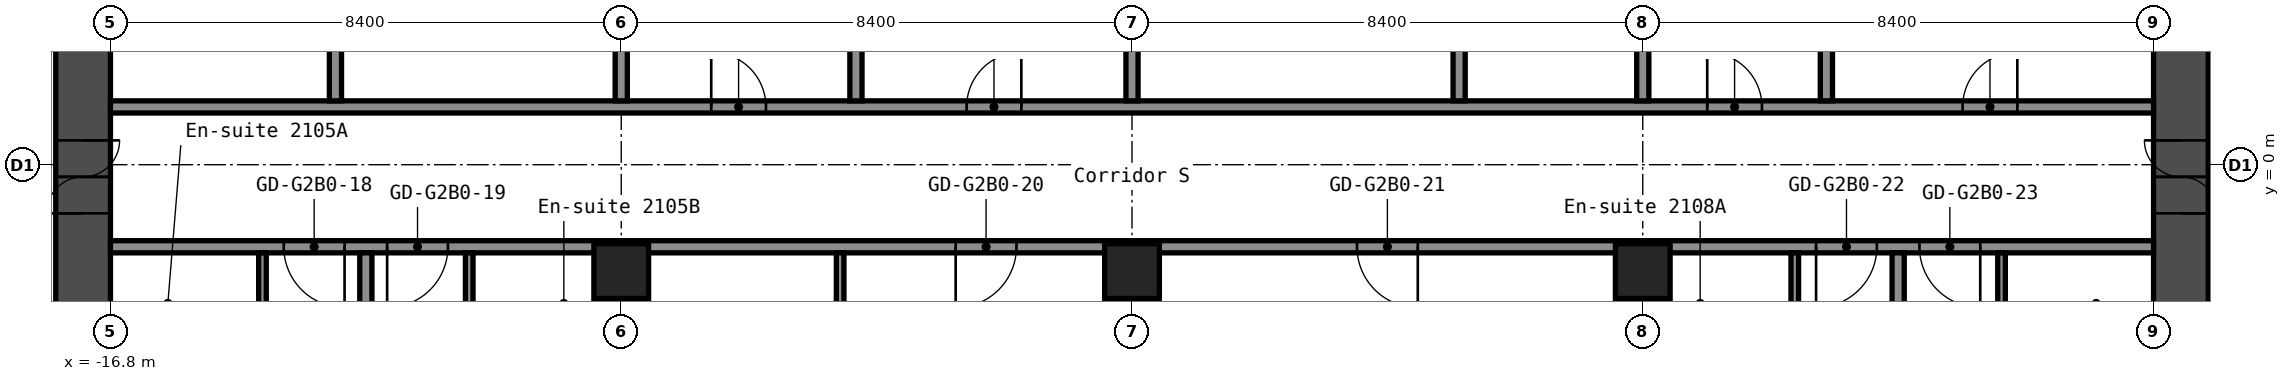
"""IFC4 building model, lengths in metres.
Left out: names, types, materials, properties, quantities, classifications, styles, units other than length and angle.
Written with IfcOpenShell. Run it as: python <this file> out.ifc"""

import sys

from ifc_helpers import new_model, si_unit, direction, frame, frame_2d, origin, origin_2d, place, context, subcontext, project, spatial, rectangle, hollow_rectangle, extrude, element, fill, save


model = new_model("IFC4")
c1 = context("Model", 3, precision=1e-05, world=origin(), true_north=direction((0.0, 1.0)))
c2 = subcontext(c1, "Body", "Model", "MODEL_VIEW")
j1 = project(units=[si_unit("LENGTHUNIT", "METRE"), si_unit("PLANEANGLEUNIT", "RADIAN")], contexts=[c1])
p1 = place(None, origin())
s1 = spatial("IfcSite", under=j1, at=p1, CompositionType="ELEMENT")
p2 = place(p1, origin())
s2 = spatial("IfcBuilding", under=s1, at=p2, CompositionType="ELEMENT")
p3 = place(p2, frame((0.0, 0.0, 78.6)))
s3 = spatial("IfcBuildingStorey", under=s2, at=p3, CompositionType="ELEMENT", Elevation=78.6)
for number, where, z_axis, x_axis in (
    (1, (-8.4, -1.75, 0.0), (0.0, 0.0, 1.0), (1.0, 0.0, 0.0)),
    (2, (0.0, -1.75, 0.0), (0.0, 0.0, 1.0), (1.0, 0.0, 0.0)),
    (3, (8.4, -1.75, 0.0), (0.0, 0.0, 1.0), (1.0, 0.0, 0.0)),
):
    element("IfcColumn", number, at=place(p3, frame(where, z_axis=z_axis, x_axis=x_axis)), inside=s3, PredefinedType="COLUMN", context=c2, shape_type="SweptSolid", body=[
        extrude(hollow_rectangle(XDim=0.9, YDim=0.9, WallThickness=0.036, at=origin_2d()), origin(), (0.0, 0.0, 1.0), 2.8),
    ])
p4 = place(p3, frame((-17.25, -8.4, 0.0), z_axis=(0.0, 0.0, 1.0), x_axis=(0.0, 1.0, 0.0)))
e4 = element("IfcWall", 4, at=p4, inside=s3, PredefinedType="SHEAR", context=c2, shape_type="SweptSolid", body=[
    extrude(rectangle(XDim=16.8, YDim=0.9, at=frame_2d((8.4, 0.0))), origin(), (0.0, 0.0, 1.0), 2.8),
])
p5 = place(p4, frame((7.6, 0.0, 0.0)))
e5 = element("IfcOpeningElement", 5, at=p5, cuts=e4, PredefinedType="OPENING", context=c2, shape_type="SweptSolid", body=[
    extrude(rectangle(XDim=1.2, YDim=2.1, at=frame_2d((0.6, 1.05))), frame((0.0, 0.46, 0.0), z_axis=(0.0, -1.0, 0.0), x_axis=(1.0, 0.0, 0.0)), (0.0, 0.0, 1.0), 0.92),
])
p6 = place(p3, frame((17.25, -8.4, 0.0), z_axis=(0.0, 0.0, 1.0), x_axis=(0.0, 1.0, 0.0)))
e6 = element("IfcWall", 6, at=p6, inside=s3, PredefinedType="SHEAR", context=c2, shape_type="SweptSolid", body=[
    extrude(rectangle(XDim=16.8, YDim=0.9, at=frame_2d((8.4, 0.0))), origin(), (0.0, 0.0, 1.0), 2.8),
])
p7 = place(p6, frame((7.6, 0.0, 0.0)))
e7 = element("IfcOpeningElement", 7, at=p7, cuts=e6, PredefinedType="OPENING", context=c2, shape_type="SweptSolid", body=[
    extrude(rectangle(XDim=1.2, YDim=2.1, at=frame_2d((0.6, 1.05))), frame((0.0, 0.46, 0.0), z_axis=(0.0, -1.0, 0.0), x_axis=(1.0, 0.0, 0.0)), (0.0, 0.0, 1.0), 0.92),
])
p8 = place(p3, frame((-16.8, -1.35, 0.0), z_axis=(0.0, 0.0, 1.0), x_axis=(1.0, 0.0, 0.0)))
e8 = element("IfcWall", 8, at=p8, inside=s3, PredefinedType="PARTITIONING", context=c2, shape_type="SweptSolid", body=[
    extrude(rectangle(XDim=33.6, YDim=0.2, at=frame_2d((16.8, 0.0))), origin(), (0.0, 0.0, 1.0), 2.8),
])
p9 = place(p8, frame((2.85, 0.0, 0.0)))
e9 = element("IfcOpeningElement", 9, at=p9, cuts=e8, PredefinedType="OPENING", context=c2, shape_type="SweptSolid", body=[
    extrude(rectangle(XDim=1.0, YDim=2.1, at=frame_2d((0.5, 1.05))), frame((0.0, 0.11, 0.0), z_axis=(0.0, -1.0, 0.0), x_axis=(1.0, 0.0, 0.0)), (0.0, 0.0, 1.0), 0.22),
])
p10 = place(p8, frame((4.55, 0.0, 0.0)))
e10 = element("IfcOpeningElement", 10, at=p10, cuts=e8, PredefinedType="OPENING", context=c2, shape_type="SweptSolid", body=[
    extrude(rectangle(XDim=1.0, YDim=2.1, at=frame_2d((0.5, 1.05))), frame((0.0, 0.11, 0.0), z_axis=(0.0, -1.0, 0.0), x_axis=(1.0, 0.0, 0.0)), (0.0, 0.0, 1.0), 0.22),
])
p11 = place(p8, frame((13.9, 0.0, 0.0)))
e11 = element("IfcOpeningElement", 11, at=p11, cuts=e8, PredefinedType="OPENING", context=c2, shape_type="SweptSolid", body=[
    extrude(rectangle(XDim=1.0, YDim=2.1, at=frame_2d((0.5, 1.05))), frame((0.0, 0.11, 0.0), z_axis=(0.0, -1.0, 0.0), x_axis=(1.0, 0.0, 0.0)), (0.0, 0.0, 1.0), 0.22),
])
p12 = place(p8, frame((20.5, 0.0, 0.0)))
e12 = element("IfcOpeningElement", 12, at=p12, cuts=e8, PredefinedType="OPENING", context=c2, shape_type="SweptSolid", body=[
    extrude(rectangle(XDim=1.0, YDim=2.1, at=frame_2d((0.5, 1.05))), frame((0.0, 0.11, 0.0), z_axis=(0.0, -1.0, 0.0), x_axis=(1.0, 0.0, 0.0)), (0.0, 0.0, 1.0), 0.22),
])
p13 = place(p8, frame((28.05, 0.0, 0.0)))
e13 = element("IfcOpeningElement", 13, at=p13, cuts=e8, PredefinedType="OPENING", context=c2, shape_type="SweptSolid", body=[
    extrude(rectangle(XDim=1.0, YDim=2.1, at=frame_2d((0.5, 1.05))), frame((0.0, 0.11, 0.0), z_axis=(0.0, -1.0, 0.0), x_axis=(1.0, 0.0, 0.0)), (0.0, 0.0, 1.0), 0.22),
])
p14 = place(p8, frame((29.75, 0.0, 0.0)))
e14 = element("IfcOpeningElement", 14, at=p14, cuts=e8, PredefinedType="OPENING", context=c2, shape_type="SweptSolid", body=[
    extrude(rectangle(XDim=1.0, YDim=2.1, at=frame_2d((0.5, 1.05))), frame((0.0, 0.11, 0.0), z_axis=(0.0, -1.0, 0.0), x_axis=(1.0, 0.0, 0.0)), (0.0, 0.0, 1.0), 0.22),
])
p15 = place(p3, frame((-16.8, 0.95, 0.0), z_axis=(0.0, 0.0, 1.0), x_axis=(1.0, 0.0, 0.0)))
e15 = element("IfcWall", 15, at=p15, inside=s3, PredefinedType="PARTITIONING", context=c2, shape_type="SweptSolid", body=[
    extrude(rectangle(XDim=33.6, YDim=0.2, at=frame_2d((16.8, 0.0))), origin(), (0.0, 0.0, 1.0), 2.8),
])
p16 = place(p15, frame((9.88, 0.0, 0.0)))
e16 = element("IfcOpeningElement", 16, at=p16, cuts=e15, PredefinedType="OPENING", context=c2, shape_type="SweptSolid", body=[
    extrude(rectangle(XDim=0.9, YDim=2.1, at=frame_2d((0.45, 1.05))), frame((0.0, 0.11, 0.0), z_axis=(0.0, -1.0, 0.0), x_axis=(1.0, 0.0, 0.0)), (0.0, 0.0, 1.0), 0.22),
])
p17 = place(p15, frame((14.08, 0.0, 0.0)))
e17 = element("IfcOpeningElement", 17, at=p17, cuts=e15, PredefinedType="OPENING", context=c2, shape_type="SweptSolid", body=[
    extrude(rectangle(XDim=0.9, YDim=2.1, at=frame_2d((0.45, 1.05))), frame((0.0, 0.11, 0.0), z_axis=(0.0, -1.0, 0.0), x_axis=(1.0, 0.0, 0.0)), (0.0, 0.0, 1.0), 0.22),
])
p18 = place(p15, frame((26.26, 0.0, 0.0)))
e18 = element("IfcOpeningElement", 18, at=p18, cuts=e15, PredefinedType="OPENING", context=c2, shape_type="SweptSolid", body=[
    extrude(rectangle(XDim=0.9, YDim=2.1, at=frame_2d((0.45, 1.05))), frame((0.0, 0.11, 0.0), z_axis=(0.0, -1.0, 0.0), x_axis=(1.0, 0.0, 0.0)), (0.0, 0.0, 1.0), 0.22),
])
p19 = place(p15, frame((30.46, 0.0, 0.0)))
e19 = element("IfcOpeningElement", 19, at=p19, cuts=e15, PredefinedType="OPENING", context=c2, shape_type="SweptSolid", body=[
    extrude(rectangle(XDim=0.9, YDim=2.1, at=frame_2d((0.45, 1.05))), frame((0.0, 0.11, 0.0), z_axis=(0.0, -1.0, 0.0), x_axis=(1.0, 0.0, 0.0)), (0.0, 0.0, 1.0), 0.22),
])
p20 = place(p3, frame((-14.3, -4.35, 0.0), z_axis=(0.0, 0.0, 1.0), x_axis=(0.0, 1.0, 0.0)))
e20 = element("IfcWall", 20, at=p20, inside=s3, PredefinedType="PARTITIONING", context=c2, shape_type="SweptSolid", body=[
    extrude(rectangle(XDim=2.9, YDim=0.125, at=frame_2d((1.45, 0.0))), origin(), (0.0, 0.0, 1.0), 2.8),
])
p21 = place(p20, frame((0.6, 0.0, 0.0)))
e21 = element("IfcOpeningElement", 21, at=p21, cuts=e20, PredefinedType="OPENING", context=c2, shape_type="SweptSolid", body=[
    extrude(rectangle(XDim=0.8, YDim=2.1, at=frame_2d((0.4, 1.05))), frame((0.0, 0.073, 0.0), z_axis=(0.0, -1.0, 0.0), x_axis=(1.0, 0.0, 0.0)), (0.0, 0.0, 1.0), 0.145),
])
p22 = place(p3, frame((-13.1, 1.05, 0.0), z_axis=(0.0, 0.0, 1.0), x_axis=(0.0, 1.0, 0.0)))
e22 = element("IfcWall", 22, at=p22, inside=s3, PredefinedType="PARTITIONING", context=c2, shape_type="SweptSolid", body=[
    extrude(rectangle(XDim=5.9, YDim=0.2, at=frame_2d((2.95, 0.0))), origin(), (0.0, 0.0, 1.0), 2.8),
])
p23 = place(p3, frame((-12.6, -15.55, 0.0), z_axis=(0.0, 0.0, 1.0), x_axis=(0.0, 1.0, 0.0)))
e23 = element("IfcWall", 23, at=p23, inside=s3, PredefinedType="PARTITIONING", context=c2, shape_type="SweptSolid", body=[
    extrude(rectangle(XDim=14.1, YDim=0.2, at=frame_2d((7.05, 0.0))), origin(), (0.0, 0.0, 1.0), 2.8),
])
p24 = place(p3, frame((-10.9, -4.35, 0.0), z_axis=(0.0, 0.0, 1.0), x_axis=(0.0, 1.0, 0.0)))
e24 = element("IfcWall", 24, at=p24, inside=s3, PredefinedType="PARTITIONING", context=c2, shape_type="SweptSolid", body=[
    extrude(rectangle(XDim=2.9, YDim=0.125, at=frame_2d((1.45, 0.0))), origin(), (0.0, 0.0, 1.0), 2.8),
])
p25 = place(p24, frame((0.6, 0.0, 0.0)))
e25 = element("IfcOpeningElement", 25, at=p25, cuts=e24, PredefinedType="OPENING", context=c2, shape_type="SweptSolid", body=[
    extrude(rectangle(XDim=0.8, YDim=2.1, at=frame_2d((0.4, 1.05))), frame((0.0, 0.073, 0.0), z_axis=(0.0, -1.0, 0.0), x_axis=(1.0, 0.0, 0.0)), (0.0, 0.0, 1.0), 0.145),
])
p26 = place(p3, frame((-8.4, -15.55, 0.0), z_axis=(0.0, 0.0, 1.0), x_axis=(0.0, 1.0, 0.0)))
e26 = element("IfcWall", 26, at=p26, inside=s3, PredefinedType="PARTITIONING", context=c2, shape_type="SweptSolid", body=[
    extrude(rectangle(XDim=13.36, YDim=0.2, at=frame_2d((6.68, 0.0))), origin(), (0.0, 0.0, 1.0), 2.8),
])
p27 = place(p3, frame((-8.4, 1.05, 0.0), z_axis=(0.0, 0.0, 1.0), x_axis=(0.0, 1.0, 0.0)))
e27 = element("IfcWall", 27, at=p27, inside=s3, PredefinedType="PARTITIONING", context=c2, shape_type="SweptSolid", body=[
    extrude(rectangle(XDim=5.9, YDim=0.2, at=frame_2d((2.95, 0.0))), origin(), (0.0, 0.0, 1.0), 2.8),
])
p28 = place(p3, frame((-4.8, -4.75, 0.0), z_axis=(0.0, 0.0, 1.0), x_axis=(0.0, 1.0, 0.0)))
e28 = element("IfcWall", 28, at=p28, inside=s3, PredefinedType="PARTITIONING", context=c2, shape_type="SweptSolid", body=[
    extrude(rectangle(XDim=3.3, YDim=0.125, at=frame_2d((1.65, 0.0))), origin(), (0.0, 0.0, 1.0), 2.8),
])
p29 = place(p28, frame((1.2, 0.0, 0.0)))
e29 = element("IfcOpeningElement", 29, at=p29, cuts=e28, PredefinedType="OPENING", context=c2, shape_type="SweptSolid", body=[
    extrude(rectangle(XDim=1.0, YDim=2.1, at=frame_2d((0.5, 1.05))), frame((0.0, 0.073, 0.0), z_axis=(0.0, -1.0, 0.0), x_axis=(1.0, 0.0, 0.0)), (0.0, 0.0, 1.0), 0.145),
])
p30 = place(p3, frame((-4.54, 1.05, 0.0), z_axis=(0.0, 0.0, 1.0), x_axis=(0.0, 1.0, 0.0)))
e30 = element("IfcWall", 30, at=p30, inside=s3, PredefinedType="PARTITIONING", context=c2, shape_type="SweptSolid", body=[
    extrude(rectangle(XDim=5.9, YDim=0.2, at=frame_2d((2.95, 0.0))), origin(), (0.0, 0.0, 1.0), 2.8),
])
p31 = place(p3, frame((0.0, -15.55, 0.0), z_axis=(0.0, 0.0, 1.0), x_axis=(0.0, 1.0, 0.0)))
e31 = element("IfcWall", 31, at=p31, inside=s3, PredefinedType="PARTITIONING", context=c2, shape_type="SweptSolid", body=[
    extrude(rectangle(XDim=13.36, YDim=0.2, at=frame_2d((6.68, 0.0))), origin(), (0.0, 0.0, 1.0), 2.8),
])
for number, where, z_axis, x_axis in (
    (32, (0.0, 1.05, 0.0), (0.0, 0.0, 1.0), (0.0, 1.0, 0.0)),
    (33, (5.38, 1.05, 0.0), (0.0, 0.0, 1.0), (0.0, 1.0, 0.0)),
):
    element("IfcWall", number, at=place(p3, frame(where, z_axis=z_axis, x_axis=x_axis)), inside=s3, PredefinedType="PARTITIONING", context=c2, shape_type="SweptSolid", body=[
        extrude(rectangle(XDim=5.9, YDim=0.2, at=frame_2d((2.95, 0.0))), origin(), (0.0, 0.0, 1.0), 2.8),
    ])
p32 = place(p3, frame((8.4, -15.55, 0.0), z_axis=(0.0, 0.0, 1.0), x_axis=(0.0, 1.0, 0.0)))
e34 = element("IfcWall", 34, at=p32, inside=s3, PredefinedType="PARTITIONING", context=c2, shape_type="SweptSolid", body=[
    extrude(rectangle(XDim=13.36, YDim=0.2, at=frame_2d((6.68, 0.0))), origin(), (0.0, 0.0, 1.0), 2.8),
])
p33 = place(p3, frame((8.4, 1.05, 0.0), z_axis=(0.0, 0.0, 1.0), x_axis=(0.0, 1.0, 0.0)))
e35 = element("IfcWall", 35, at=p33, inside=s3, PredefinedType="PARTITIONING", context=c2, shape_type="SweptSolid", body=[
    extrude(rectangle(XDim=5.9, YDim=0.2, at=frame_2d((2.95, 0.0))), origin(), (0.0, 0.0, 1.0), 2.8),
])
p34 = place(p3, frame((10.9, -4.35, 0.0), z_axis=(0.0, 0.0, 1.0), x_axis=(0.0, 1.0, 0.0)))
e36 = element("IfcWall", 36, at=p34, inside=s3, PredefinedType="PARTITIONING", context=c2, shape_type="SweptSolid", body=[
    extrude(rectangle(XDim=2.9, YDim=0.125, at=frame_2d((1.45, 0.0))), origin(), (0.0, 0.0, 1.0), 2.8),
])
p35 = place(p34, frame((0.6, 0.0, 0.0)))
e37 = element("IfcOpeningElement", 37, at=p35, cuts=e36, PredefinedType="OPENING", context=c2, shape_type="SweptSolid", body=[
    extrude(rectangle(XDim=0.8, YDim=2.1, at=frame_2d((0.4, 1.05))), frame((0.0, 0.073, 0.0), z_axis=(0.0, -1.0, 0.0), x_axis=(1.0, 0.0, 0.0)), (0.0, 0.0, 1.0), 0.145),
])
p36 = place(p3, frame((11.42, 1.05, 0.0), z_axis=(0.0, 0.0, 1.0), x_axis=(0.0, 1.0, 0.0)))
e38 = element("IfcWall", 38, at=p36, inside=s3, PredefinedType="PARTITIONING", context=c2, shape_type="SweptSolid", body=[
    extrude(rectangle(XDim=5.9, YDim=0.2, at=frame_2d((2.95, 0.0))), origin(), (0.0, 0.0, 1.0), 2.8),
])
p37 = place(p3, frame((12.6, -15.55, 0.0), z_axis=(0.0, 0.0, 1.0), x_axis=(0.0, 1.0, 0.0)))
e39 = element("IfcWall", 39, at=p37, inside=s3, PredefinedType="PARTITIONING", context=c2, shape_type="SweptSolid", body=[
    extrude(rectangle(XDim=14.1, YDim=0.2, at=frame_2d((7.05, 0.0))), origin(), (0.0, 0.0, 1.0), 2.8),
])
p38 = place(p3, frame((14.3, -4.35, 0.0), z_axis=(0.0, 0.0, 1.0), x_axis=(0.0, 1.0, 0.0)))
e40 = element("IfcWall", 40, at=p38, inside=s3, PredefinedType="PARTITIONING", context=c2, shape_type="SweptSolid", body=[
    extrude(rectangle(XDim=2.9, YDim=0.125, at=frame_2d((1.45, 0.0))), origin(), (0.0, 0.0, 1.0), 2.8),
])
p39 = place(p38, frame((0.6, 0.0, 0.0)))
e41 = element("IfcOpeningElement", 41, at=p39, cuts=e40, PredefinedType="OPENING", context=c2, shape_type="SweptSolid", body=[
    extrude(rectangle(XDim=0.8, YDim=2.1, at=frame_2d((0.4, 1.05))), frame((0.0, 0.073, 0.0), z_axis=(0.0, -1.0, 0.0), x_axis=(1.0, 0.0, 0.0)), (0.0, 0.0, 1.0), 0.145),
])
p40 = place(p5, origin())
e42 = element("IfcDoor", 42, at=p40, inside=s3, OperationType="DOUBLE_DOOR_SINGLE_SWING", PredefinedType="DOOR", context=c2, shape_type="SweptSolid", body=[
    extrude(rectangle(XDim=1.2, YDim=2.1, at=frame_2d((0.6, 1.05))), frame((0.0, 0.025, 0.0), z_axis=(0.0, -1.0, 0.0), x_axis=(1.0, 0.0, 0.0)), (0.0, 0.0, 1.0), 0.05),
])
fill(e5, e42)
p41 = place(p7, origin())
e43 = element("IfcDoor", 43, at=p41, inside=s3, OperationType="DOUBLE_DOOR_SINGLE_SWING", PredefinedType="DOOR", context=c2, shape_type="SweptSolid", body=[
    extrude(rectangle(XDim=1.2, YDim=2.1, at=frame_2d((0.6, 1.05))), frame((0.0, 0.025, 0.0), z_axis=(0.0, -1.0, 0.0), x_axis=(1.0, 0.0, 0.0)), (0.0, 0.0, 1.0), 0.05),
])
fill(e7, e43)
p42 = place(p9, origin())
e44 = element("IfcDoor", 44, at=p42, inside=s3, OperationType="SINGLE_SWING_RIGHT", PredefinedType="DOOR", context=c2, shape_type="SweptSolid", body=[
    extrude(rectangle(XDim=1.0, YDim=2.1, at=frame_2d((0.5, 1.05))), frame((0.0, 0.025, 0.0), z_axis=(0.0, -1.0, 0.0), x_axis=(1.0, 0.0, 0.0)), (0.0, 0.0, 1.0), 0.05),
])
fill(e9, e44)
p43 = place(p10, origin())
e45 = element("IfcDoor", 45, at=p43, inside=s3, OperationType="SINGLE_SWING_LEFT", PredefinedType="DOOR", context=c2, shape_type="SweptSolid", body=[
    extrude(rectangle(XDim=1.0, YDim=2.1, at=frame_2d((0.5, 1.05))), frame((0.0, 0.025, 0.0), z_axis=(0.0, -1.0, 0.0), x_axis=(1.0, 0.0, 0.0)), (0.0, 0.0, 1.0), 0.05),
])
fill(e10, e45)
p44 = place(p11, origin())
e46 = element("IfcDoor", 46, at=p44, inside=s3, OperationType="SINGLE_SWING_LEFT", PredefinedType="DOOR", context=c2, shape_type="SweptSolid", body=[
    extrude(rectangle(XDim=1.0, YDim=2.1, at=frame_2d((0.5, 1.05))), frame((0.0, 0.025, 0.0), z_axis=(0.0, -1.0, 0.0), x_axis=(1.0, 0.0, 0.0)), (0.0, 0.0, 1.0), 0.05),
])
fill(e11, e46)
p45 = place(p12, origin())
e47 = element("IfcDoor", 47, at=p45, inside=s3, OperationType="SINGLE_SWING_RIGHT", PredefinedType="DOOR", context=c2, shape_type="SweptSolid", body=[
    extrude(rectangle(XDim=1.0, YDim=2.1, at=frame_2d((0.5, 1.05))), frame((0.0, 0.025, 0.0), z_axis=(0.0, -1.0, 0.0), x_axis=(1.0, 0.0, 0.0)), (0.0, 0.0, 1.0), 0.05),
])
fill(e12, e47)
p46 = place(p13, origin())
e48 = element("IfcDoor", 48, at=p46, inside=s3, OperationType="SINGLE_SWING_LEFT", PredefinedType="DOOR", context=c2, shape_type="SweptSolid", body=[
    extrude(rectangle(XDim=1.0, YDim=2.1, at=frame_2d((0.5, 1.05))), frame((0.0, 0.025, 0.0), z_axis=(0.0, -1.0, 0.0), x_axis=(1.0, 0.0, 0.0)), (0.0, 0.0, 1.0), 0.05),
])
fill(e13, e48)
p47 = place(p14, origin())
e49 = element("IfcDoor", 49, at=p47, inside=s3, OperationType="SINGLE_SWING_RIGHT", PredefinedType="DOOR", context=c2, shape_type="SweptSolid", body=[
    extrude(rectangle(XDim=1.0, YDim=2.1, at=frame_2d((0.5, 1.05))), frame((0.0, 0.025, 0.0), z_axis=(0.0, -1.0, 0.0), x_axis=(1.0, 0.0, 0.0)), (0.0, 0.0, 1.0), 0.05),
])
fill(e14, e49)
p48 = place(p16, origin())
e50 = element("IfcDoor", 50, at=p48, inside=s3, OperationType="SINGLE_SWING_RIGHT", PredefinedType="DOOR", context=c2, shape_type="SweptSolid", body=[
    extrude(rectangle(XDim=0.9, YDim=2.1, at=frame_2d((0.45, 1.05))), frame((0.0, 0.025, 0.0), z_axis=(0.0, -1.0, 0.0), x_axis=(1.0, 0.0, 0.0)), (0.0, 0.0, 1.0), 0.05),
])
fill(e16, e50)
p49 = place(p17, origin())
e51 = element("IfcDoor", 51, at=p49, inside=s3, OperationType="SINGLE_SWING_LEFT", PredefinedType="DOOR", context=c2, shape_type="SweptSolid", body=[
    extrude(rectangle(XDim=0.9, YDim=2.1, at=frame_2d((0.45, 1.05))), frame((0.0, 0.025, 0.0), z_axis=(0.0, -1.0, 0.0), x_axis=(1.0, 0.0, 0.0)), (0.0, 0.0, 1.0), 0.05),
])
fill(e17, e51)
p50 = place(p18, origin())
e52 = element("IfcDoor", 52, at=p50, inside=s3, OperationType="SINGLE_SWING_RIGHT", PredefinedType="DOOR", context=c2, shape_type="SweptSolid", body=[
    extrude(rectangle(XDim=0.9, YDim=2.1, at=frame_2d((0.45, 1.05))), frame((0.0, 0.025, 0.0), z_axis=(0.0, -1.0, 0.0), x_axis=(1.0, 0.0, 0.0)), (0.0, 0.0, 1.0), 0.05),
])
fill(e18, e52)
p51 = place(p19, origin())
e53 = element("IfcDoor", 53, at=p51, inside=s3, OperationType="SINGLE_SWING_LEFT", PredefinedType="DOOR", context=c2, shape_type="SweptSolid", body=[
    extrude(rectangle(XDim=0.9, YDim=2.1, at=frame_2d((0.45, 1.05))), frame((0.0, 0.025, 0.0), z_axis=(0.0, -1.0, 0.0), x_axis=(1.0, 0.0, 0.0)), (0.0, 0.0, 1.0), 0.05),
])
fill(e19, e53)
save(model, sys.argv[1])
